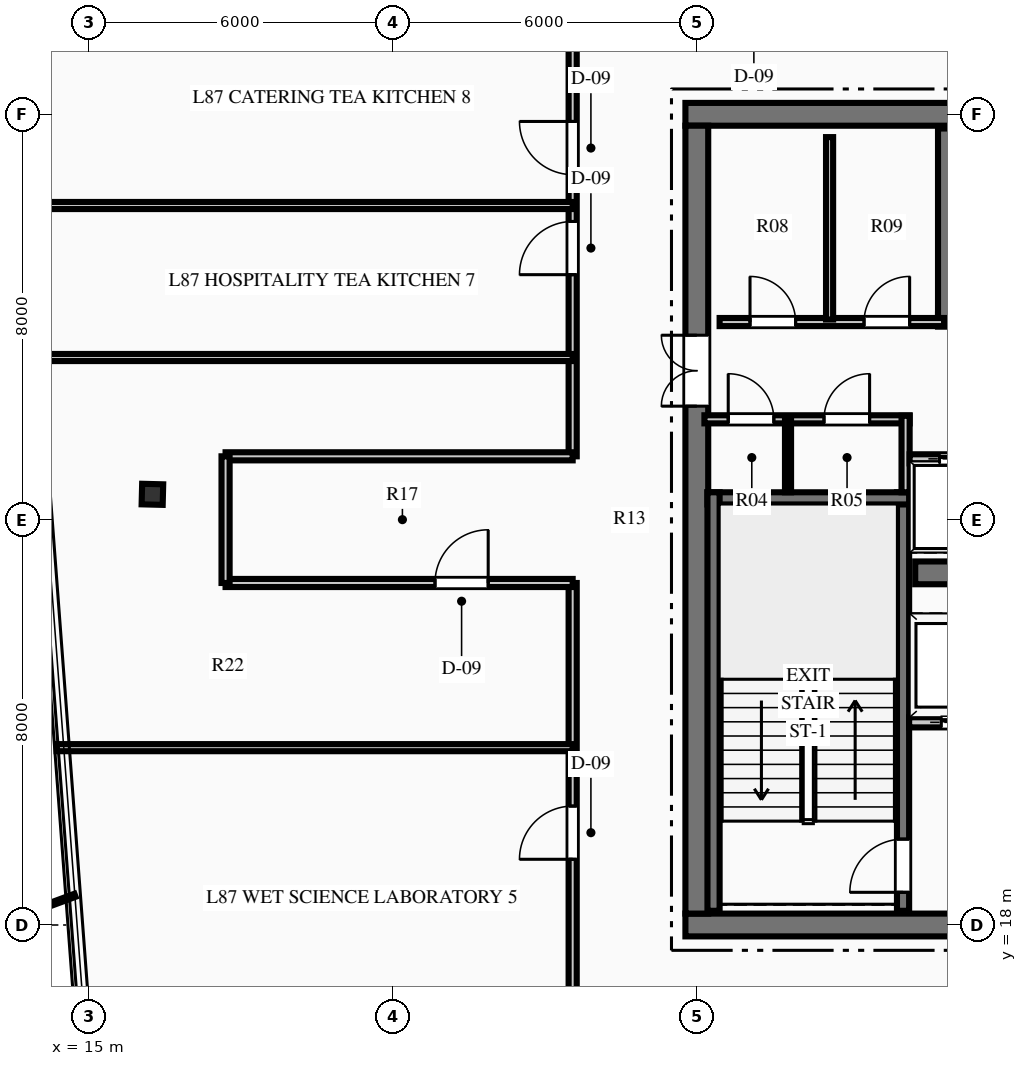
"""IFC4 building model, lengths in metres.
Left out: names, types, materials, properties, quantities, classifications, styles, units other than length and angle.
Written with IfcOpenShell. Run it as: python <this file> out.ifc"""

import sys

from ifc_helpers import new_model, si_unit, direction, frame, frame_2d, origin, origin_2d, place, context, subcontext, project, spatial, rectangle, i_section, extrude, element, fill, save


model = new_model("IFC4")
c1 = context("Model", 3, precision=1e-05, world=origin(), true_north=direction((0.0, 1.0)))
c2 = subcontext(c1, "Body", "Model", "MODEL_VIEW")
j1 = project(units=[si_unit("LENGTHUNIT", "METRE"), si_unit("PLANEANGLEUNIT", "RADIAN")], contexts=[c1])
p1 = place(None, origin())
s1 = spatial("IfcSite", under=j1, at=p1, CompositionType="ELEMENT")
p2 = place(p1, origin())
s2 = spatial("IfcBuilding", under=s1, at=p2, CompositionType="ELEMENT")
p3 = place(p2, frame((0.0, 0.0, 343.95)))
s3 = spatial("IfcBuildingStorey", under=s2, at=p3, CompositionType="ELEMENT", Elevation=343.95)
p4 = place(p3, frame((26.775, 18.0, 0.0), z_axis=(0.0, 0.0, 1.0), x_axis=(1.0, 0.0, 0.0)))
e1 = element("IfcWall", 1, at=p4, inside=s3, PredefinedType="SHEAR", context=c2, shape_type="SweptSolid", body=[
    extrude(rectangle(XDim=18.45, YDim=0.45, at=frame_2d((9.225, 0.0))), origin(), (0.0, 0.0, 1.0), 3.75),
])
p5 = place(p4, frame((7.325, 0.0, 0.0)))
e2 = element("IfcOpeningElement", 2, at=p5, cuts=e1, PredefinedType="OPENING", context=c2, shape_type="SweptSolid", body=[
    extrude(rectangle(XDim=1.1, YDim=2.15, at=frame_2d((0.55, 1.075))), frame((0.0, 0.235, 0.0), z_axis=(0.0, -1.0, 0.0), x_axis=(1.0, 0.0, 0.0)), (0.0, 0.0, 1.0), 0.47),
])
p6 = place(p4, frame((10.025, 0.0, 0.0)))
e3 = element("IfcOpeningElement", 3, at=p6, cuts=e1, PredefinedType="OPENING", context=c2, shape_type="SweptSolid", body=[
    extrude(rectangle(XDim=1.1, YDim=2.15, at=frame_2d((0.55, 1.075))), frame((0.0, 0.235, 0.0), z_axis=(0.0, -1.0, 0.0), x_axis=(1.0, 0.0, 0.0)), (0.0, 0.0, 1.0), 0.47),
])
p7 = place(p3, frame((26.775, 34.0, 0.0), z_axis=(0.0, 0.0, 1.0), x_axis=(1.0, 0.0, 0.0)))
e4 = element("IfcWall", 4, at=p7, inside=s3, PredefinedType="SHEAR", context=c2, shape_type="SweptSolid", body=[
    extrude(rectangle(XDim=18.45, YDim=0.45, at=frame_2d((9.225, 0.0))), origin(), (0.0, 0.0, 1.0), 3.75),
])
p8 = place(p3, frame((27.0, 18.225, 0.0), z_axis=(0.0, 0.0, 1.0), x_axis=(0.0, 1.0, 0.0)))
e5 = element("IfcWall", 5, at=p8, inside=s3, PredefinedType="SHEAR", context=c2, shape_type="SweptSolid", body=[
    extrude(rectangle(XDim=15.55, YDim=0.45, at=frame_2d((7.775, 0.0))), origin(), (0.0, 0.0, 1.0), 3.75),
])
p9 = place(p8, frame((10.015, 0.0, 0.0)))
e6 = element("IfcOpeningElement", 6, at=p9, cuts=e5, PredefinedType="OPENING", context=c2, shape_type="SweptSolid", body=[
    extrude(rectangle(XDim=1.4, YDim=2.2, at=frame_2d((0.7, 1.1))), frame((0.0, 0.235, 0.0), z_axis=(0.0, -1.0, 0.0), x_axis=(1.0, 0.0, 0.0)), (0.0, 0.0, 1.0), 0.47),
])
p10 = place(p3, frame((31.31, 24.95, 0.0), z_axis=(0.0, 0.0, 1.0), x_axis=(1.0, 0.0, 0.0)))
e7 = element("IfcWall", 7, at=p10, inside=s3, PredefinedType="SHEAR", context=c2, shape_type="SweptSolid", body=[
    extrude(rectangle(XDim=9.38, YDim=0.45, at=frame_2d((4.69, 0.0))), origin(), (0.0, 0.0, 1.0), 3.75),
])
p11 = place(p3, frame((31.07, 18.28, 0.0), z_axis=(0.0, 0.0, 1.0), x_axis=(0.0, 1.0, 0.0)))
e8 = element("IfcWall", 8, at=p11, inside=s3, PredefinedType="SHEAR", context=c2, shape_type="SweptSolid", body=[
    extrude(rectangle(XDim=8.26, YDim=0.24, at=frame_2d((4.13, 0.0))), origin(), (0.0, 0.0, 1.0), 3.75),
])
p12 = place(p11, frame((0.365, 0.0, 0.0)))
e9 = element("IfcOpeningElement", 9, at=p12, cuts=e8, PredefinedType="OPENING", context=c2, shape_type="SweptSolid", body=[
    extrude(rectangle(XDim=1.05, YDim=2.15, at=frame_2d((0.525, 1.075))), frame((0.0, 0.13, 0.0), z_axis=(0.0, -1.0, 0.0), x_axis=(1.0, 0.0, 0.0)), (0.0, 0.0, 1.0), 0.26),
])
p13 = place(p3, frame((27.21, 26.42, 0.0), z_axis=(0.0, 0.0, 1.0), x_axis=(1.0, 0.0, 0.0)))
e10 = element("IfcWall", 10, at=p13, inside=s3, PredefinedType="SHEAR", context=c2, shape_type="SweptSolid", body=[
    extrude(rectangle(XDim=3.98, YDim=0.24, at=frame_2d((1.99, 0.0))), origin(), (0.0, 0.0, 1.0), 3.75),
])
p14 = place(p3, frame((27.33, 18.28, 0.0), z_axis=(0.0, 0.0, 1.0), x_axis=(0.0, 1.0, 0.0)))
e11 = element("IfcWall", 11, at=p14, inside=s3, PredefinedType="SHEAR", context=c2, shape_type="SweptSolid", body=[
    extrude(rectangle(XDim=8.26, YDim=0.24, at=frame_2d((4.13, 0.0))), origin(), (0.0, 0.0, 1.0), 3.75),
])
p15 = place(p3, frame((31.76, 29.93, 0.0), z_axis=(0.0, 0.0, 1.0), x_axis=(1.0, 0.0, 0.0)))
e12 = element("IfcWall", 12, at=p15, inside=s3, PredefinedType="SHEAR", context=c2, shape_type="SweptSolid", body=[
    extrude(rectangle(XDim=8.38, YDim=0.24, at=frame_2d((4.19, 0.0))), origin(), (0.0, 0.0, 1.0), 3.75),
])
p16 = place(p15, frame((0.565, 0.0, 0.0)))
e13 = element("IfcOpeningElement", 13, at=p16, cuts=e12, PredefinedType="OPENING", context=c2, shape_type="SweptSolid", body=[
    extrude(rectangle(XDim=1.05, YDim=2.15, at=frame_2d((0.525, 1.075))), frame((0.0, 0.13, 0.0), z_axis=(0.0, -1.0, 0.0), x_axis=(1.0, 0.0, 0.0)), (0.0, 0.0, 1.0), 0.26),
])
p17 = place(p3, frame((31.88, 29.93, 0.0), z_axis=(0.0, 0.0, 1.0), x_axis=(0.0, 1.0, 0.0)))
e14 = element("IfcWall", 14, at=p17, inside=s3, PredefinedType="SHEAR", context=c2, shape_type="SweptSolid", body=[
    extrude(rectangle(XDim=3.79, YDim=0.24, at=frame_2d((1.895, 0.0))), origin(), (0.0, 0.0, 1.0), 3.75),
])
p18 = place(p3, frame((16.256, 26.5, 0.0), z_axis=(0.0, 0.0, 1.0), x_axis=(0.025304572866, 0.999679788028, 0.0)))
e15 = element("IfcColumn", 15, at=p18, inside=s3, PredefinedType="COLUMN", context=c2, shape_type="SweptSolid", body=[
    extrude(i_section(OverallWidth=0.406, OverallDepth=0.416, WebThickness=0.03, FlangeThickness=0.048, at=origin_2d()), origin(), (0.0, 0.0, 1.0), 3.75),
])
p19 = place(p3, frame((31.19, 22.0, 0.0), z_axis=(0.0, 0.0, 1.0), x_axis=(1.0, 0.0, 0.0)))
e16 = element("IfcWall", 16, at=p19, inside=s3, PredefinedType="PARTITIONING", context=c2, shape_type="SweptSolid", body=[
    extrude(rectangle(XDim=4.69, YDim=0.2, at=frame_2d((2.345, 0.0))), origin(), (0.0, 0.0, 1.0), 3.43),
])
p20 = place(p19, frame((2.91, 0.0, 0.0)))
e17 = element("IfcOpeningElement", 17, at=p20, cuts=e16, PredefinedType="OPENING", context=c2, shape_type="SweptSolid", body=[
    extrude(rectangle(XDim=0.9, YDim=2.15, at=frame_2d((0.45, 1.075))), frame((0.0, 0.11, 0.0), z_axis=(0.0, -1.0, 0.0), x_axis=(1.0, 0.0, 0.0)), (0.0, 0.0, 1.0), 0.22),
])
p21 = place(p19, frame((0.635, 0.0, 0.0)))
e18 = element("IfcOpeningElement", 18, at=p21, cuts=e16, PredefinedType="OPENING", context=c2, shape_type="SweptSolid", body=[
    extrude(rectangle(XDim=1.1, YDim=2.15, at=frame_2d((0.55, 1.075))), frame((0.0, 0.11, 0.0), z_axis=(0.0, -1.0, 0.0), x_axis=(1.0, 0.0, 0.0)), (0.0, 0.0, 1.0), 0.22),
])
p22 = place(p3, frame((27.15, 27.98, 0.0), z_axis=(0.0, 0.0, 1.0), x_axis=(1.0, 0.0, 0.0)))
e19 = element("IfcWall", 19, at=p22, inside=s3, PredefinedType="PARTITIONING", context=c2, shape_type="SweptSolid", body=[
    extrude(rectangle(XDim=4.05, YDim=0.16, at=frame_2d((2.025, 0.0))), origin(), (0.0, 0.0, 1.0), 3.43),
])
p23 = place(p22, frame((0.47, 0.0, 0.0)))
e20 = element("IfcOpeningElement", 20, at=p23, cuts=e19, PredefinedType="OPENING", context=c2, shape_type="SweptSolid", body=[
    extrude(rectangle(XDim=0.9, YDim=2.15, at=frame_2d((0.45, 1.075))), frame((0.0, 0.09, 0.0), z_axis=(0.0, -1.0, 0.0), x_axis=(1.0, 0.0, 0.0)), (0.0, 0.0, 1.0), 0.18),
])
p24 = place(p22, frame((2.36, 0.0, 0.0)))
e21 = element("IfcOpeningElement", 21, at=p24, cuts=e19, PredefinedType="OPENING", context=c2, shape_type="SweptSolid", body=[
    extrude(rectangle(XDim=0.9, YDim=2.15, at=frame_2d((0.45, 1.075))), frame((0.0, 0.09, 0.0), z_axis=(0.0, -1.0, 0.0), x_axis=(1.0, 0.0, 0.0)), (0.0, 0.0, 1.0), 0.18),
])
p25 = place(p3, frame((31.12, 26.54, 0.0), z_axis=(0.0, 0.0, 1.0), x_axis=(0.0, 1.0, 0.0)))
e22 = element("IfcWall", 22, at=p25, inside=s3, PredefinedType="PARTITIONING", context=c2, shape_type="SweptSolid", body=[
    extrude(rectangle(XDim=1.51, YDim=0.16, at=frame_2d((0.755, 0.0))), origin(), (0.0, 0.0, 1.0), 3.43),
])
p26 = place(p3, frame((28.8, 26.54, 0.0), z_axis=(0.0, 0.0, 1.0), x_axis=(0.0, 1.0, 0.0)))
e23 = element("IfcWall", 23, at=p26, inside=s3, PredefinedType="PARTITIONING", context=c2, shape_type="SweptSolid", body=[
    extrude(rectangle(XDim=1.44, YDim=0.12, at=frame_2d((0.72, 0.0))), origin(), (0.0, 0.0, 1.0), 3.43),
])
p27 = place(p3, frame((27.45, 29.9, 0.0), z_axis=(0.0, 0.0, 1.0), x_axis=(1.0, 0.0, 0.0)))
e24 = element("IfcWall", 24, at=p27, inside=s3, PredefinedType="PARTITIONING", context=c2, shape_type="SweptSolid", body=[
    extrude(rectangle(XDim=4.43, YDim=0.16, at=frame_2d((2.215, 0.0))), origin(), (0.0, 0.0, 1.0), 3.43),
])
p28 = place(p27, frame((0.6, 0.0, 0.0)))
e25 = element("IfcOpeningElement", 25, at=p28, cuts=e24, PredefinedType="OPENING", context=c2, shape_type="SweptSolid", body=[
    extrude(rectangle(XDim=0.9, YDim=2.15, at=frame_2d((0.45, 1.075))), frame((0.0, 0.09, 0.0), z_axis=(0.0, -1.0, 0.0), x_axis=(1.0, 0.0, 0.0)), (0.0, 0.0, 1.0), 0.18),
])
p29 = place(p27, frame((2.85, 0.0, 0.0)))
e26 = element("IfcOpeningElement", 26, at=p29, cuts=e24, PredefinedType="OPENING", context=c2, shape_type="SweptSolid", body=[
    extrude(rectangle(XDim=0.9, YDim=2.15, at=frame_2d((0.45, 1.075))), frame((0.0, 0.09, 0.0), z_axis=(0.0, -1.0, 0.0), x_axis=(1.0, 0.0, 0.0)), (0.0, 0.0, 1.0), 0.18),
])
p30 = place(p3, frame((29.62, 29.95, 0.0), z_axis=(0.0, 0.0, 1.0), x_axis=(0.0, 1.0, 0.0)))
e27 = element("IfcWall", 27, at=p30, inside=s3, PredefinedType="PARTITIONING", context=c2, shape_type="SweptSolid", body=[
    extrude(rectangle(XDim=3.6, YDim=0.14, at=frame_2d((1.8, 0.0))), origin(), (0.0, 0.0, 1.0), 3.43),
])
p31 = place(p3, frame((31.2, 27.2, 0.0), z_axis=(0.0, 0.0, 1.0), x_axis=(1.0, 0.0, 0.0)))
e28 = element("IfcWall", 28, at=p31, inside=s3, PredefinedType="PARTITIONING", context=c2, shape_type="SweptSolid", body=[
    extrude(rectangle(XDim=9.6, YDim=0.18, at=frame_2d((4.8, 0.0))), origin(), (0.0, 0.0, 1.0), 3.43),
])
p32 = place(p31, frame((0.59, 0.0, 0.0)))
e29 = element("IfcOpeningElement", 29, at=p32, cuts=e28, PredefinedType="OPENING", context=c2, shape_type="SweptSolid", body=[
    extrude(rectangle(XDim=1.1, YDim=2.15, at=frame_2d((0.55, 1.075))), frame((0.0, 0.1, 0.0), z_axis=(0.0, -1.0, 0.0), x_axis=(1.0, 0.0, 0.0)), (0.0, 0.0, 1.0), 0.2),
])
p33 = place(p31, frame((2.99, 0.0, 0.0)))
e30 = element("IfcOpeningElement", 30, at=p33, cuts=e28, PredefinedType="OPENING", context=c2, shape_type="SweptSolid", body=[
    extrude(rectangle(XDim=1.1, YDim=2.15, at=frame_2d((0.55, 1.075))), frame((0.0, 0.1, 0.0), z_axis=(0.0, -1.0, 0.0), x_axis=(1.0, 0.0, 0.0)), (0.0, 0.0, 1.0), 0.2),
])
p34 = place(p31, frame((5.51, 0.0, 0.0)))
e31 = element("IfcOpeningElement", 31, at=p34, cuts=e28, PredefinedType="OPENING", context=c2, shape_type="SweptSolid", body=[
    extrude(rectangle(XDim=1.1, YDim=2.15, at=frame_2d((0.55, 1.075))), frame((0.0, 0.1, 0.0), z_axis=(0.0, -1.0, 0.0), x_axis=(1.0, 0.0, 0.0)), (0.0, 0.0, 1.0), 0.2),
])
p35 = place(p31, frame((7.91, 0.0, 0.0)))
e32 = element("IfcOpeningElement", 32, at=p35, cuts=e28, PredefinedType="OPENING", context=c2, shape_type="SweptSolid", body=[
    extrude(rectangle(XDim=1.1, YDim=2.15, at=frame_2d((0.55, 1.075))), frame((0.0, 0.1, 0.0), z_axis=(0.0, -1.0, 0.0), x_axis=(1.0, 0.0, 0.0)), (0.0, 0.0, 1.0), 0.2),
])
p36 = place(p3, frame((24.55, 15.55, 0.0), z_axis=(0.0, 0.0, 1.0), x_axis=(0.0, 1.0, 0.0)))
e33 = element("IfcWall", 33, at=p36, inside=s3, PredefinedType="PARTITIONING", context=c2, shape_type="SweptSolid", body=[
    extrude(rectangle(XDim=9.2, YDim=0.16, at=frame_2d((4.6, 0.0))), origin(), (0.0, 0.0, 1.0), 3.43),
])
p37 = place(p36, frame((3.747, 0.0, 0.0)))
e34 = element("IfcOpeningElement", 34, at=p37, cuts=e33, PredefinedType="OPENING", context=c2, shape_type="SweptSolid", body=[
    extrude(rectangle(XDim=1.05, YDim=2.15, at=frame_2d((0.525, 1.075))), frame((0.0, 0.09, 0.0), z_axis=(0.0, -1.0, 0.0), x_axis=(1.0, 0.0, 0.0)), (0.0, 0.0, 1.0), 0.18),
])
p38 = place(p3, frame((24.55, 27.25, 0.0), z_axis=(0.0, 0.0, 1.0), x_axis=(0.0, 1.0, 0.0)))
e35 = element("IfcWall", 35, at=p38, inside=s3, PredefinedType="PARTITIONING", context=c2, shape_type="SweptSolid", body=[
    extrude(rectangle(XDim=9.2, YDim=0.16, at=frame_2d((4.6, 0.0))), origin(), (0.0, 0.0, 1.0), 3.43),
])
p39 = place(p38, frame((3.585, 0.0, 0.0)))
e36 = element("IfcOpeningElement", 36, at=p39, cuts=e35, PredefinedType="OPENING", context=c2, shape_type="SweptSolid", body=[
    extrude(rectangle(XDim=1.05, YDim=2.15, at=frame_2d((0.525, 1.075))), frame((0.0, 0.09, 0.0), z_axis=(0.0, -1.0, 0.0), x_axis=(1.0, 0.0, 0.0)), (0.0, 0.0, 1.0), 0.18),
])
p40 = place(p38, frame((5.559, 0.0, 0.0)))
e37 = element("IfcOpeningElement", 37, at=p40, cuts=e35, PredefinedType="OPENING", context=c2, shape_type="SweptSolid", body=[
    extrude(rectangle(XDim=1.05, YDim=2.15, at=frame_2d((0.525, 1.075))), frame((0.0, 0.09, 0.0), z_axis=(0.0, -1.0, 0.0), x_axis=(1.0, 0.0, 0.0)), (0.0, 0.0, 1.0), 0.18),
])
p41 = place(p3, frame((17.7, 24.75, 0.0), z_axis=(0.0, 0.0, 1.0), x_axis=(1.0, 0.0, 0.0)))
e38 = element("IfcWall", 38, at=p41, inside=s3, PredefinedType="PARTITIONING", context=c2, shape_type="SweptSolid", body=[
    extrude(rectangle(XDim=6.85, YDim=0.16, at=frame_2d((3.425, 0.0))), origin(), (0.0, 0.0, 1.0), 3.43),
])
p42 = place(p41, frame((4.133, 0.0, 0.0)))
e39 = element("IfcOpeningElement", 39, at=p42, cuts=e38, PredefinedType="OPENING", context=c2, shape_type="SweptSolid", body=[
    extrude(rectangle(XDim=1.05, YDim=2.15, at=frame_2d((0.525, 1.075))), frame((0.0, 0.09, 0.0), z_axis=(0.0, -1.0, 0.0), x_axis=(1.0, 0.0, 0.0)), (0.0, 0.0, 1.0), 0.18),
])
p43 = place(p3, frame((17.7, 27.25, 0.0), z_axis=(0.0, 0.0, 1.0), x_axis=(1.0, 0.0, 0.0)))
e40 = element("IfcWall", 40, at=p43, inside=s3, PredefinedType="PARTITIONING", context=c2, shape_type="SweptSolid", body=[
    extrude(rectangle(XDim=6.85, YDim=0.16, at=frame_2d((3.425, 0.0))), origin(), (0.0, 0.0, 1.0), 3.43),
])
p44 = place(p3, frame((17.7, 24.75, 0.0), z_axis=(0.0, 0.0, 1.0), x_axis=(0.0, 1.0, 0.0)))
e41 = element("IfcWall", 41, at=p44, inside=s3, PredefinedType="PARTITIONING", context=c2, shape_type="SweptSolid", body=[
    extrude(rectangle(XDim=2.5, YDim=0.16, at=frame_2d((1.25, 0.0))), origin(), (0.0, 0.0, 1.0), 3.43),
])
p45 = place(p3, frame((14.366, 21.5, 0.0), z_axis=(0.0, 0.0, 1.0), x_axis=(1.0, 0.0, 0.0)))
e42 = element("IfcWall", 42, at=p45, inside=s3, PredefinedType="PARTITIONING", context=c2, shape_type="SweptSolid", body=[
    extrude(rectangle(XDim=10.184, YDim=0.14, at=frame_2d((5.092, 0.0))), origin(), (0.0, 0.0, 1.0), 3.43),
])
p46 = place(p3, frame((13.788, 29.2, 0.0), z_axis=(0.0, 0.0, 1.0), x_axis=(1.0, 0.0, 0.0)))
e43 = element("IfcWall", 43, at=p46, inside=s3, PredefinedType="PARTITIONING", context=c2, shape_type="SweptSolid", body=[
    extrude(rectangle(XDim=10.762, YDim=0.14, at=frame_2d((5.381, 0.0))), origin(), (0.0, 0.0, 1.0), 3.43),
])
p47 = place(p3, frame((13.562, 32.2, 0.0), z_axis=(0.0, 0.0, 1.0), x_axis=(1.0, 0.0, 0.0)))
e44 = element("IfcWall", 44, at=p47, inside=s3, PredefinedType="PARTITIONING", context=c2, shape_type="SweptSolid", body=[
    extrude(rectangle(XDim=10.988, YDim=0.14, at=frame_2d((5.494, 0.0))), origin(), (0.0, 0.0, 1.0), 3.43),
])
p48 = place(p23, origin())
e45 = element("IfcDoor", 45, at=p48, inside=s3, OperationType="SINGLE_SWING_LEFT", PredefinedType="DOOR", context=c2, shape_type="SweptSolid", body=[
    extrude(rectangle(XDim=0.9, YDim=2.15, at=frame_2d((0.45, 1.075))), frame((0.0, 0.025, 0.0), z_axis=(0.0, -1.0, 0.0), x_axis=(1.0, 0.0, 0.0)), (0.0, 0.0, 1.0), 0.05),
])
fill(e20, e45)
p49 = place(p24, origin())
e46 = element("IfcDoor", 46, at=p49, inside=s3, OperationType="SINGLE_SWING_RIGHT", PredefinedType="DOOR", context=c2, shape_type="SweptSolid", body=[
    extrude(rectangle(XDim=0.9, YDim=2.15, at=frame_2d((0.45, 1.075))), frame((0.0, 0.025, 0.0), z_axis=(0.0, -1.0, 0.0), x_axis=(1.0, 0.0, 0.0)), (0.0, 0.0, 1.0), 0.05),
])
fill(e21, e46)
p50 = place(p28, origin())
e47 = element("IfcDoor", 47, at=p50, inside=s3, OperationType="SINGLE_SWING_LEFT", PredefinedType="DOOR", context=c2, shape_type="SweptSolid", body=[
    extrude(rectangle(XDim=0.9, YDim=2.15, at=frame_2d((0.45, 1.075))), frame((0.0, 0.025, 0.0), z_axis=(0.0, -1.0, 0.0), x_axis=(1.0, 0.0, 0.0)), (0.0, 0.0, 1.0), 0.05),
])
fill(e25, e47)
p51 = place(p29, origin())
e48 = element("IfcDoor", 48, at=p51, inside=s3, OperationType="SINGLE_SWING_RIGHT", PredefinedType="DOOR", context=c2, shape_type="SweptSolid", body=[
    extrude(rectangle(XDim=0.9, YDim=2.15, at=frame_2d((0.45, 1.075))), frame((0.0, 0.025, 0.0), z_axis=(0.0, -1.0, 0.0), x_axis=(1.0, 0.0, 0.0)), (0.0, 0.0, 1.0), 0.05),
])
fill(e26, e48)
p52 = place(p12, origin())
e49 = element("IfcDoor", 49, at=p52, inside=s3, OperationType="SINGLE_SWING_LEFT", PredefinedType="DOOR", context=c2, shape_type="SweptSolid", body=[
    extrude(rectangle(XDim=1.05, YDim=2.15, at=frame_2d((0.525, 1.075))), frame((0.0, 0.025, 0.0), z_axis=(0.0, -1.0, 0.0), x_axis=(1.0, 0.0, 0.0)), (0.0, 0.0, 1.0), 0.05),
])
fill(e9, e49)
p53 = place(p9, origin())
e50 = element("IfcDoor", 50, at=p53, inside=s3, OperationType="DOUBLE_DOOR_SINGLE_SWING", PredefinedType="DOOR", context=c2, shape_type="SweptSolid", body=[
    extrude(rectangle(XDim=1.4, YDim=2.2, at=frame_2d((0.7, 1.1))), frame((0.0, 0.025, 0.0), z_axis=(0.0, -1.0, 0.0), x_axis=(1.0, 0.0, 0.0)), (0.0, 0.0, 1.0), 0.05),
])
fill(e6, e50)
p54 = place(p37, origin())
e51 = element("IfcDoor", 51, at=p54, inside=s3, OperationType="SINGLE_SWING_LEFT", PredefinedType="DOOR", context=c2, shape_type="SweptSolid", body=[
    extrude(rectangle(XDim=1.05, YDim=2.15, at=frame_2d((0.525, 1.075))), frame((0.0, 0.025, 0.0), z_axis=(0.0, -1.0, 0.0), x_axis=(1.0, 0.0, 0.0)), (0.0, 0.0, 1.0), 0.05),
])
fill(e34, e51)
p55 = place(p42, origin())
e52 = element("IfcDoor", 52, at=p55, inside=s3, OperationType="SINGLE_SWING_RIGHT", PredefinedType="DOOR", context=c2, shape_type="SweptSolid", body=[
    extrude(rectangle(XDim=1.05, YDim=2.15, at=frame_2d((0.525, 1.075))), frame((0.0, 0.025, 0.0), z_axis=(0.0, -1.0, 0.0), x_axis=(1.0, 0.0, 0.0)), (0.0, 0.0, 1.0), 0.05),
])
fill(e39, e52)
p56 = place(p39, origin())
e53 = element("IfcDoor", 53, at=p56, inside=s3, OperationType="SINGLE_SWING_LEFT", PredefinedType="DOOR", context=c2, shape_type="SweptSolid", body=[
    extrude(rectangle(XDim=1.05, YDim=2.15, at=frame_2d((0.525, 1.075))), frame((0.0, 0.025, 0.0), z_axis=(0.0, -1.0, 0.0), x_axis=(1.0, 0.0, 0.0)), (0.0, 0.0, 1.0), 0.05),
])
fill(e36, e53)
p57 = place(p40, origin())
e54 = element("IfcDoor", 54, at=p57, inside=s3, OperationType="SINGLE_SWING_RIGHT", PredefinedType="DOOR", context=c2, shape_type="SweptSolid", body=[
    extrude(rectangle(XDim=1.05, YDim=2.15, at=frame_2d((0.525, 1.075))), frame((0.0, 0.025, 0.0), z_axis=(0.0, -1.0, 0.0), x_axis=(1.0, 0.0, 0.0)), (0.0, 0.0, 1.0), 0.05),
])
fill(e37, e54)
p58 = place(p32, origin())
e55 = element("IfcDoor", 55, at=p58, inside=s3, OperationType="SLIDING_TO_LEFT", PredefinedType="DOOR", context=c2, shape_type="SweptSolid", body=[
    extrude(rectangle(XDim=1.1, YDim=2.15, at=frame_2d((0.55, 1.075))), frame((0.0, 0.025, 0.0), z_axis=(0.0, -1.0, 0.0), x_axis=(1.0, 0.0, 0.0)), (0.0, 0.0, 1.0), 0.05),
])
fill(e29, e55)
p59 = place(p21, origin())
e56 = element("IfcDoor", 56, at=p59, inside=s3, OperationType="SLIDING_TO_LEFT", PredefinedType="DOOR", context=c2, shape_type="SweptSolid", body=[
    extrude(rectangle(XDim=1.1, YDim=2.15, at=frame_2d((0.55, 1.075))), frame((0.0, 0.025, 0.0), z_axis=(0.0, -1.0, 0.0), x_axis=(1.0, 0.0, 0.0)), (0.0, 0.0, 1.0), 0.05),
])
fill(e18, e56)
save(model, sys.argv[1])
